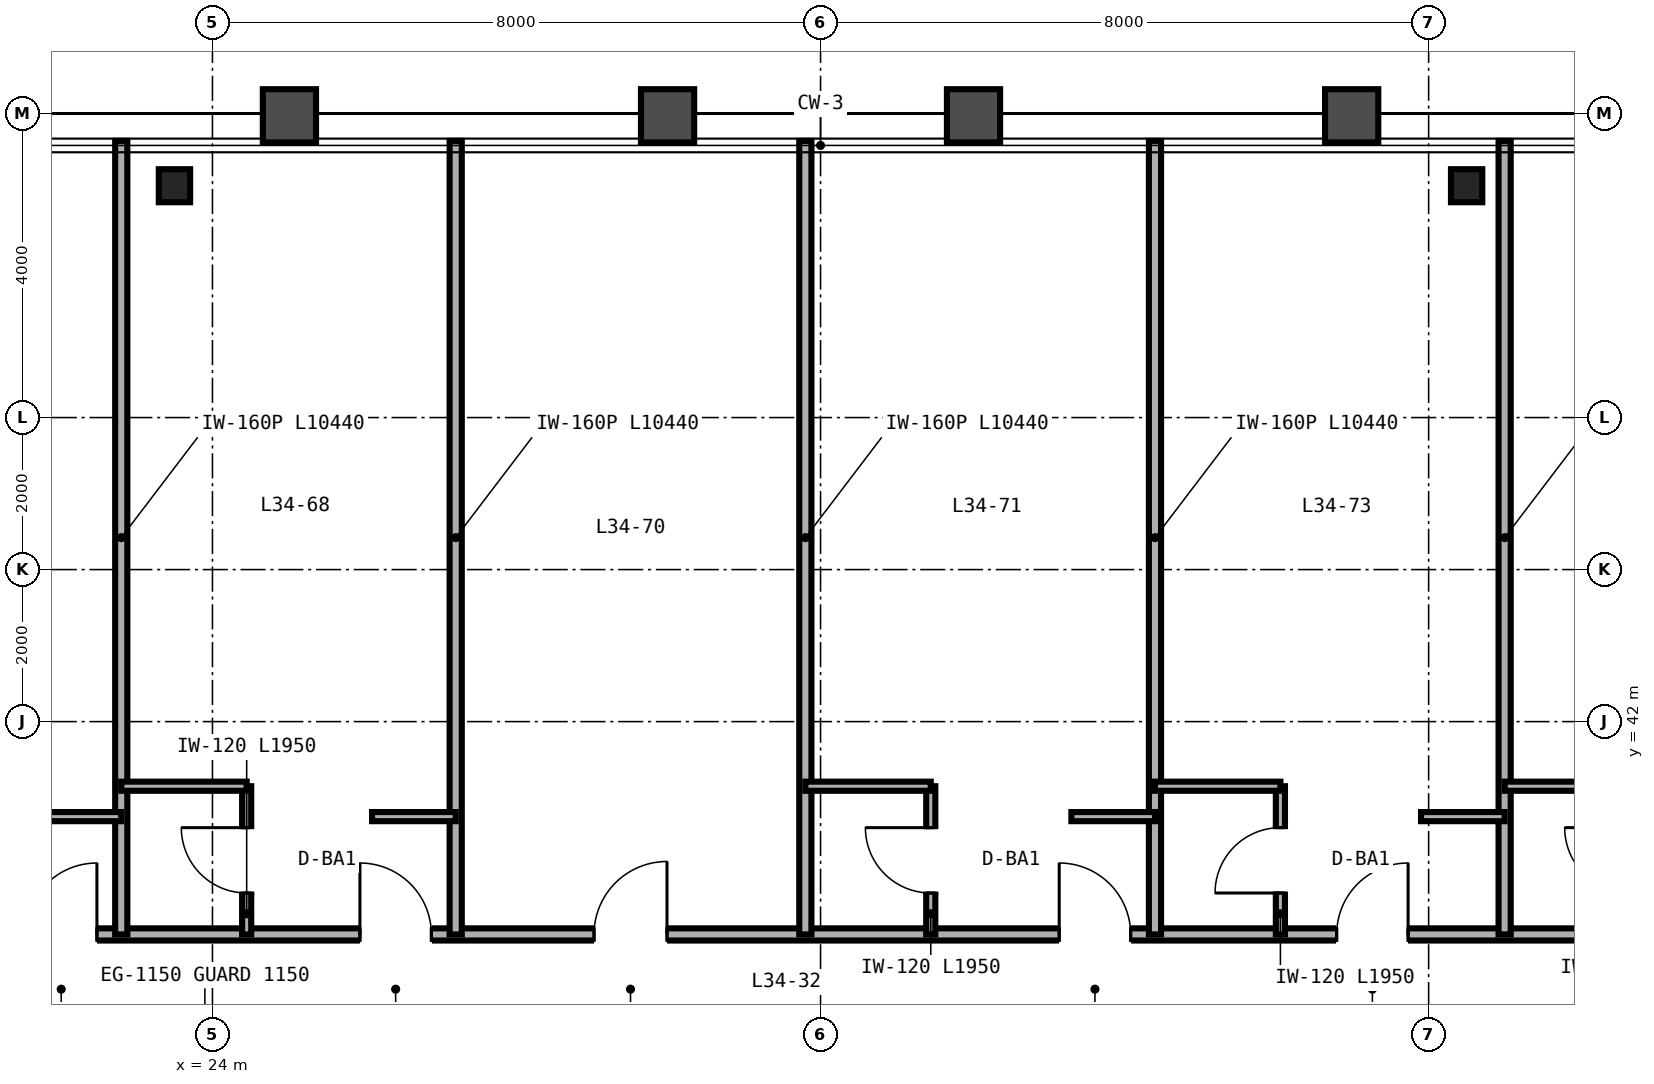
"""IFC4 building model, lengths in metres.
Left out: names, types, materials, properties, quantities, classifications, styles, units other than length and angle.
Written with IfcOpenShell. Run it as: python <this file> out.ifc"""

import sys

from ifc_helpers import new_model, si_unit, direction, frame, frame_2d, origin, origin_2d, place, context, subcontext, project, spatial, rectangle, i_section, extrude, source, transform, mapped, element, fill, save


model = new_model("IFC4")
c1 = context("Model", 3, precision=1e-05, world=origin(), true_north=direction((0.0, 1.0)))
c2 = subcontext(c1, "Body", "Model", "MODEL_VIEW")
j1 = project(units=[si_unit("LENGTHUNIT", "METRE"), si_unit("PLANEANGLEUNIT", "RADIAN")], contexts=[c1])
p1 = place(None, origin())
s1 = spatial("IfcSite", under=j1, at=p1, CompositionType="ELEMENT")
p2 = place(p1, origin())
s2 = spatial("IfcBuilding", under=s1, at=p2, CompositionType="ELEMENT")
p3 = place(p2, frame((0.0, 0.0, 136.8)))
s3 = spatial("IfcBuildingStorey", under=s2, at=p3, CompositionType="ELEMENT", Elevation=136.8)
m1 = source(origin(), c2, "Body", "SweptSolid", [
    extrude(i_section(OverallWidth=0.412, OverallDepth=0.435, WebThickness=0.036, FlangeThickness=0.057, FilletRadius=0.025, at=origin_2d()), origin(), (0.0, 0.0, 1.0), 3.36),
])
for number, where, z_axis, x_axis in (
    (1, (23.5, 49.05, 0.0), (0.0, 0.0, 1.0), (1.0, 0.0, 0.0)),
    (2, (40.5, 49.05, 0.0), (0.0, 0.0, 1.0), (1.0, 0.0, 0.0)),
):
    element("IfcColumn", number, at=place(p3, frame(where, z_axis=z_axis, x_axis=x_axis)), inside=s3, PredefinedType="COLUMN", context=c2, shape_type="MappedRepresentation", body=[
        mapped(m1, transform((0.0, 0.0, 0.0), scale=1.0)),
    ])
p4 = place(p3, frame((14.0, 39.2, 0.0), z_axis=(0.0, 0.0, 1.0), x_axis=(1.0, 0.0, 0.0)))
e3 = element("IfcWall", 3, at=p4, inside=s3, PredefinedType="PARTITIONING", context=c2, shape_type="SweptSolid", body=[
    extrude(rectangle(XDim=36.0, YDim=0.16, at=frame_2d((18.0, 0.0))), origin(), (0.0, 0.0, 1.0), 2.581),
])
p5 = place(p4, frame((3.14, 0.0, 0.0)))
e4 = element("IfcOpeningElement", 4, at=p5, cuts=e3, PredefinedType="OPENING", context=c2, shape_type="SweptSolid", body=[
    extrude(rectangle(XDim=0.94, YDim=2.15, at=frame_2d((0.47, 1.075))), frame((0.0, 0.09, 0.0), z_axis=(0.0, -1.0, 0.0), x_axis=(1.0, 0.0, 0.0)), (0.0, 0.0, 1.0), 0.18),
])
p6 = place(p4, frame((7.54, 0.0, 0.0)))
e5 = element("IfcOpeningElement", 5, at=p6, cuts=e3, PredefinedType="OPENING", context=c2, shape_type="SweptSolid", body=[
    extrude(rectangle(XDim=0.94, YDim=2.15, at=frame_2d((0.47, 1.075))), frame((0.0, 0.09, 0.0), z_axis=(0.0, -1.0, 0.0), x_axis=(1.0, 0.0, 0.0)), (0.0, 0.0, 1.0), 0.18),
])
p7 = place(p4, frame((11.94, 0.0, 0.0)))
e6 = element("IfcOpeningElement", 6, at=p7, cuts=e3, PredefinedType="OPENING", context=c2, shape_type="SweptSolid", body=[
    extrude(rectangle(XDim=0.94, YDim=2.15, at=frame_2d((0.47, 1.075))), frame((0.0, 0.09, 0.0), z_axis=(0.0, -1.0, 0.0), x_axis=(1.0, 0.0, 0.0)), (0.0, 0.0, 1.0), 0.18),
])
p8 = place(p4, frame((15.02, 0.0, 0.0)))
e7 = element("IfcOpeningElement", 7, at=p8, cuts=e3, PredefinedType="OPENING", context=c2, shape_type="SweptSolid", body=[
    extrude(rectangle(XDim=0.96, YDim=2.15, at=frame_2d((0.48, 1.075))), frame((0.0, 0.09, 0.0), z_axis=(0.0, -1.0, 0.0), x_axis=(1.0, 0.0, 0.0)), (0.0, 0.0, 1.0), 0.18),
])
p9 = place(p4, frame((21.14, 0.0, 0.0)))
e8 = element("IfcOpeningElement", 8, at=p9, cuts=e3, PredefinedType="OPENING", context=c2, shape_type="SweptSolid", body=[
    extrude(rectangle(XDim=0.94, YDim=2.15, at=frame_2d((0.47, 1.075))), frame((0.0, 0.09, 0.0), z_axis=(0.0, -1.0, 0.0), x_axis=(1.0, 0.0, 0.0)), (0.0, 0.0, 1.0), 0.18),
])
p10 = place(p4, frame((24.79, 0.0, 0.0)))
e9 = element("IfcOpeningElement", 9, at=p10, cuts=e3, PredefinedType="OPENING", context=c2, shape_type="SweptSolid", body=[
    extrude(rectangle(XDim=0.94, YDim=2.15, at=frame_2d((0.47, 1.075))), frame((0.0, 0.09, 0.0), z_axis=(0.0, -1.0, 0.0), x_axis=(1.0, 0.0, 0.0)), (0.0, 0.0, 1.0), 0.18),
])
p11 = place(p4, frame((30.24, 0.0, 0.0)))
e10 = element("IfcOpeningElement", 10, at=p11, cuts=e3, PredefinedType="OPENING", context=c2, shape_type="SweptSolid", body=[
    extrude(rectangle(XDim=0.94, YDim=2.15, at=frame_2d((0.47, 1.075))), frame((0.0, 0.09, 0.0), z_axis=(0.0, -1.0, 0.0), x_axis=(1.0, 0.0, 0.0)), (0.0, 0.0, 1.0), 0.18),
])
p12 = place(p4, frame((34.74, 0.0, 0.0)))
e11 = element("IfcOpeningElement", 11, at=p12, cuts=e3, PredefinedType="OPENING", context=c2, shape_type="SweptSolid", body=[
    extrude(rectangle(XDim=0.94, YDim=2.15, at=frame_2d((0.47, 1.075))), frame((0.0, 0.09, 0.0), z_axis=(0.0, -1.0, 0.0), x_axis=(1.0, 0.0, 0.0)), (0.0, 0.0, 1.0), 0.18),
])
p13 = place(p3, frame((22.8, 39.2, 0.0), z_axis=(0.0, 0.0, 1.0), x_axis=(0.0, 1.0, 0.0)))
e12 = element("IfcWall", 12, at=p13, inside=s3, PredefinedType="PARTITIONING", context=c2, shape_type="SweptSolid", body=[
    extrude(rectangle(XDim=10.44, YDim=0.16, at=frame_2d((5.22, 0.0))), origin(), (0.0, 0.0, 1.0), 2.823),
])
p14 = place(p3, frame((21.7, 40.75, 0.0), z_axis=(0.0, 0.0, 1.0), x_axis=(1.0, 0.0, 0.0)))
e13 = element("IfcWall", 13, at=p14, inside=s3, PredefinedType="PARTITIONING", context=c2, shape_type="SweptSolid", body=[
    extrude(rectangle(XDim=1.1, YDim=0.12, at=frame_2d((0.55, 0.0))), origin(), (0.0, 0.0, 1.0), 3.36),
])
p15 = place(p3, frame((27.2, 39.2, 0.0), z_axis=(0.0, 0.0, 1.0), x_axis=(0.0, 1.0, 0.0)))
e14 = element("IfcWall", 14, at=p15, inside=s3, PredefinedType="PARTITIONING", context=c2, shape_type="SweptSolid", body=[
    extrude(rectangle(XDim=10.44, YDim=0.16, at=frame_2d((5.22, 0.0))), origin(), (0.0, 0.0, 1.0), 2.433),
])
p16 = place(p3, frame((24.45, 39.2, 0.0), z_axis=(0.0, 0.0, 1.0), x_axis=(0.0, 1.0, 0.0)))
e15 = element("IfcWall", 15, at=p16, inside=s3, PredefinedType="PARTITIONING", context=c2, shape_type="SweptSolid", body=[
    extrude(rectangle(XDim=1.95, YDim=0.12, at=frame_2d((0.975, 0.0))), origin(), (0.0, 0.0, 1.0), 3.36),
])
p17 = place(p16, frame((0.545, 0.0, 0.0)))
e16 = element("IfcOpeningElement", 16, at=p17, cuts=e15, PredefinedType="OPENING", context=c2, shape_type="SweptSolid", body=[
    extrude(rectangle(XDim=0.86, YDim=2.1, at=frame_2d((0.43, 1.05))), frame((0.0, 0.07, 0.0), z_axis=(0.0, -1.0, 0.0), x_axis=(1.0, 0.0, 0.0)), (0.0, 0.0, 1.0), 0.14),
])
p18 = place(p3, frame((22.8, 41.15, 0.0), z_axis=(0.0, 0.0, 1.0), x_axis=(1.0, 0.0, 0.0)))
e17 = element("IfcWall", 17, at=p18, inside=s3, PredefinedType="PARTITIONING", context=c2, shape_type="SweptSolid", body=[
    extrude(rectangle(XDim=1.65, YDim=0.12, at=frame_2d((0.825, 0.0))), origin(), (0.0, 0.0, 1.0), 2.581),
])
p19 = place(p3, frame((26.1, 40.75, 0.0), z_axis=(0.0, 0.0, 1.0), x_axis=(1.0, 0.0, 0.0)))
e18 = element("IfcWall", 18, at=p19, inside=s3, PredefinedType="PARTITIONING", context=c2, shape_type="SweptSolid", body=[
    extrude(rectangle(XDim=1.1, YDim=0.12, at=frame_2d((0.55, 0.0))), origin(), (0.0, 0.0, 1.0), 3.36),
])
for number, where, z_axis, x_axis in (
    (19, (31.8, 39.2, 0.0), (0.0, 0.0, 1.0), (0.0, 1.0, 0.0)),
    (20, (36.4, 39.2, 0.0), (0.0, 0.0, 1.0), (0.0, 1.0, 0.0)),
):
    element("IfcWall", number, at=place(p3, frame(where, z_axis=z_axis, x_axis=x_axis)), inside=s3, PredefinedType="PARTITIONING", context=c2, shape_type="SweptSolid", body=[
        extrude(rectangle(XDim=10.44, YDim=0.16, at=frame_2d((5.22, 0.0))), origin(), (0.0, 0.0, 1.0), 2.433),
    ])
p20 = place(p3, frame((33.45, 39.2, 0.0), z_axis=(0.0, 0.0, 1.0), x_axis=(0.0, 1.0, 0.0)))
e21 = element("IfcWall", 21, at=p20, inside=s3, PredefinedType="PARTITIONING", context=c2, shape_type="SweptSolid", body=[
    extrude(rectangle(XDim=1.95, YDim=0.12, at=frame_2d((0.975, 0.0))), origin(), (0.0, 0.0, 1.0), 3.36),
])
p21 = place(p20, frame((0.545, 0.0, 0.0)))
e22 = element("IfcOpeningElement", 22, at=p21, cuts=e21, PredefinedType="OPENING", context=c2, shape_type="SweptSolid", body=[
    extrude(rectangle(XDim=0.86, YDim=2.1, at=frame_2d((0.43, 1.05))), frame((0.0, 0.07, 0.0), z_axis=(0.0, -1.0, 0.0), x_axis=(1.0, 0.0, 0.0)), (0.0, 0.0, 1.0), 0.14),
])
p22 = place(p3, frame((31.8, 41.15, 0.0), z_axis=(0.0, 0.0, 1.0), x_axis=(1.0, 0.0, 0.0)))
e23 = element("IfcWall", 23, at=p22, inside=s3, PredefinedType="PARTITIONING", context=c2, shape_type="SweptSolid", body=[
    extrude(rectangle(XDim=1.65, YDim=0.12, at=frame_2d((0.825, 0.0))), origin(), (0.0, 0.0, 1.0), 3.36),
])
p23 = place(p3, frame((35.3, 40.75, 0.0), z_axis=(0.0, 0.0, 1.0), x_axis=(1.0, 0.0, 0.0)))
e24 = element("IfcWall", 24, at=p23, inside=s3, PredefinedType="PARTITIONING", context=c2, shape_type="SweptSolid", body=[
    extrude(rectangle(XDim=1.1, YDim=0.12, at=frame_2d((0.55, 0.0))), origin(), (0.0, 0.0, 1.0), 3.36),
])
p24 = place(p3, frame((41.0, 39.2, 0.0), z_axis=(0.0, 0.0, 1.0), x_axis=(0.0, 1.0, 0.0)))
e25 = element("IfcWall", 25, at=p24, inside=s3, PredefinedType="PARTITIONING", context=c2, shape_type="SweptSolid", body=[
    extrude(rectangle(XDim=10.44, YDim=0.16, at=frame_2d((5.22, 0.0))), origin(), (0.0, 0.0, 1.0), 2.823),
])
p25 = place(p3, frame((38.05, 39.2, 0.0), z_axis=(0.0, 0.0, 1.0), x_axis=(0.0, 1.0, 0.0)))
e26 = element("IfcWall", 26, at=p25, inside=s3, PredefinedType="PARTITIONING", context=c2, shape_type="SweptSolid", body=[
    extrude(rectangle(XDim=1.95, YDim=0.12, at=frame_2d((0.975, 0.0))), origin(), (0.0, 0.0, 1.0), 3.36),
])
p26 = place(p25, frame((0.545, 0.0, 0.0)))
e27 = element("IfcOpeningElement", 27, at=p26, cuts=e26, PredefinedType="OPENING", context=c2, shape_type="SweptSolid", body=[
    extrude(rectangle(XDim=0.86, YDim=2.1, at=frame_2d((0.43, 1.05))), frame((0.0, 0.07, 0.0), z_axis=(0.0, -1.0, 0.0), x_axis=(1.0, 0.0, 0.0)), (0.0, 0.0, 1.0), 0.14),
])
p27 = place(p3, frame((36.4, 41.15, 0.0), z_axis=(0.0, 0.0, 1.0), x_axis=(1.0, 0.0, 0.0)))
e28 = element("IfcWall", 28, at=p27, inside=s3, PredefinedType="PARTITIONING", context=c2, shape_type="SweptSolid", body=[
    extrude(rectangle(XDim=1.65, YDim=0.12, at=frame_2d((0.825, 0.0))), origin(), (0.0, 0.0, 1.0), 3.36),
])
p28 = place(p3, frame((39.9, 40.75, 0.0), z_axis=(0.0, 0.0, 1.0), x_axis=(1.0, 0.0, 0.0)))
e29 = element("IfcWall", 29, at=p28, inside=s3, PredefinedType="PARTITIONING", context=c2, shape_type="SweptSolid", body=[
    extrude(rectangle(XDim=1.1, YDim=0.12, at=frame_2d((0.55, 0.0))), origin(), (0.0, 0.0, 1.0), 2.581),
])
p29 = place(p3, frame((41.0, 41.15, 0.0), z_axis=(0.0, 0.0, 1.0), x_axis=(1.0, 0.0, 0.0)))
e30 = element("IfcWall", 30, at=p29, inside=s3, PredefinedType="PARTITIONING", context=c2, shape_type="SweptSolid", body=[
    extrude(rectangle(XDim=1.65, YDim=0.12, at=frame_2d((0.825, 0.0))), origin(), (0.0, 0.0, 1.0), 3.36),
])
m2 = source(origin(), c2, "Body", "SweptSolid", [
    extrude(rectangle(XDim=0.86, YDim=2.1, at=frame_2d((0.43, 1.05))), frame((0.0, 0.025, 0.0), z_axis=(0.0, -1.0, 0.0), x_axis=(1.0, 0.0, 0.0)), (0.0, 0.0, 1.0), 0.05),
])
p30 = place(p17, origin())
e31 = element("IfcDoor", 31, at=p30, inside=s3, OperationType="SINGLE_SWING_RIGHT", PredefinedType="DOOR", context=c2, shape_type="MappedRepresentation", body=[
    mapped(m2, transform((0.0, 0.0, 0.0), scale=1.0)),
])
fill(e16, e31)
p31 = place(p21, origin())
e32 = element("IfcDoor", 32, at=p31, inside=s3, OperationType="SINGLE_SWING_RIGHT", PredefinedType="DOOR", context=c2, shape_type="MappedRepresentation", body=[
    mapped(m2, transform((0.0, 0.0, 0.0), scale=1.0)),
])
fill(e22, e32)
p32 = place(p26, origin())
e33 = element("IfcDoor", 33, at=p32, inside=s3, OperationType="SINGLE_SWING_LEFT", PredefinedType="DOOR", context=c2, shape_type="MappedRepresentation", body=[
    mapped(m2, transform((0.0, 0.0, 0.0), scale=1.0)),
])
fill(e27, e33)
m3 = source(origin(), c2, "Body", "SweptSolid", [
    extrude(rectangle(XDim=0.94, YDim=2.15, at=frame_2d((0.47, 1.075))), frame((0.0, 0.025, 0.0), z_axis=(0.0, -1.0, 0.0), x_axis=(1.0, 0.0, 0.0)), (0.0, 0.0, 1.0), 0.05),
])
p33 = place(p6, origin())
e34 = element("IfcDoor", 34, at=p33, inside=s3, OperationType="SINGLE_SWING_RIGHT", PredefinedType="DOOR", context=c2, shape_type="MappedRepresentation", body=[
    mapped(m3, transform((0.0, 0.0, 0.0), scale=1.0)),
])
fill(e5, e34)
p34 = place(p7, origin())
e35 = element("IfcDoor", 35, at=p34, inside=s3, OperationType="SINGLE_SWING_LEFT", PredefinedType="DOOR", context=c2, shape_type="MappedRepresentation", body=[
    mapped(m3, transform((0.0, 0.0, 0.0), scale=1.0)),
])
fill(e6, e35)
m4 = source(origin(), c2, "Body", "SweptSolid", [
    extrude(rectangle(XDim=0.96, YDim=2.15, at=frame_2d((0.48, 1.075))), frame((0.0, 0.025, 0.0), z_axis=(0.0, -1.0, 0.0), x_axis=(1.0, 0.0, 0.0)), (0.0, 0.0, 1.0), 0.05),
])
p35 = place(p8, origin())
e36 = element("IfcDoor", 36, at=p35, inside=s3, OperationType="SINGLE_SWING_RIGHT", PredefinedType="DOOR", context=c2, shape_type="MappedRepresentation", body=[
    mapped(m4, transform((0.0, 0.0, 0.0), scale=1.0)),
])
fill(e7, e36)
p36 = place(p9, origin())
e37 = element("IfcDoor", 37, at=p36, inside=s3, OperationType="SINGLE_SWING_LEFT", PredefinedType="DOOR", context=c2, shape_type="MappedRepresentation", body=[
    mapped(m3, transform((0.0, 0.0, 0.0), scale=1.0)),
])
fill(e8, e37)
p37 = place(p10, origin())
e38 = element("IfcDoor", 38, at=p37, inside=s3, OperationType="SINGLE_SWING_RIGHT", PredefinedType="DOOR", context=c2, shape_type="MappedRepresentation", body=[
    mapped(m3, transform((0.0, 0.0, 0.0), scale=1.0)),
])
fill(e9, e38)
save(model, sys.argv[1])
